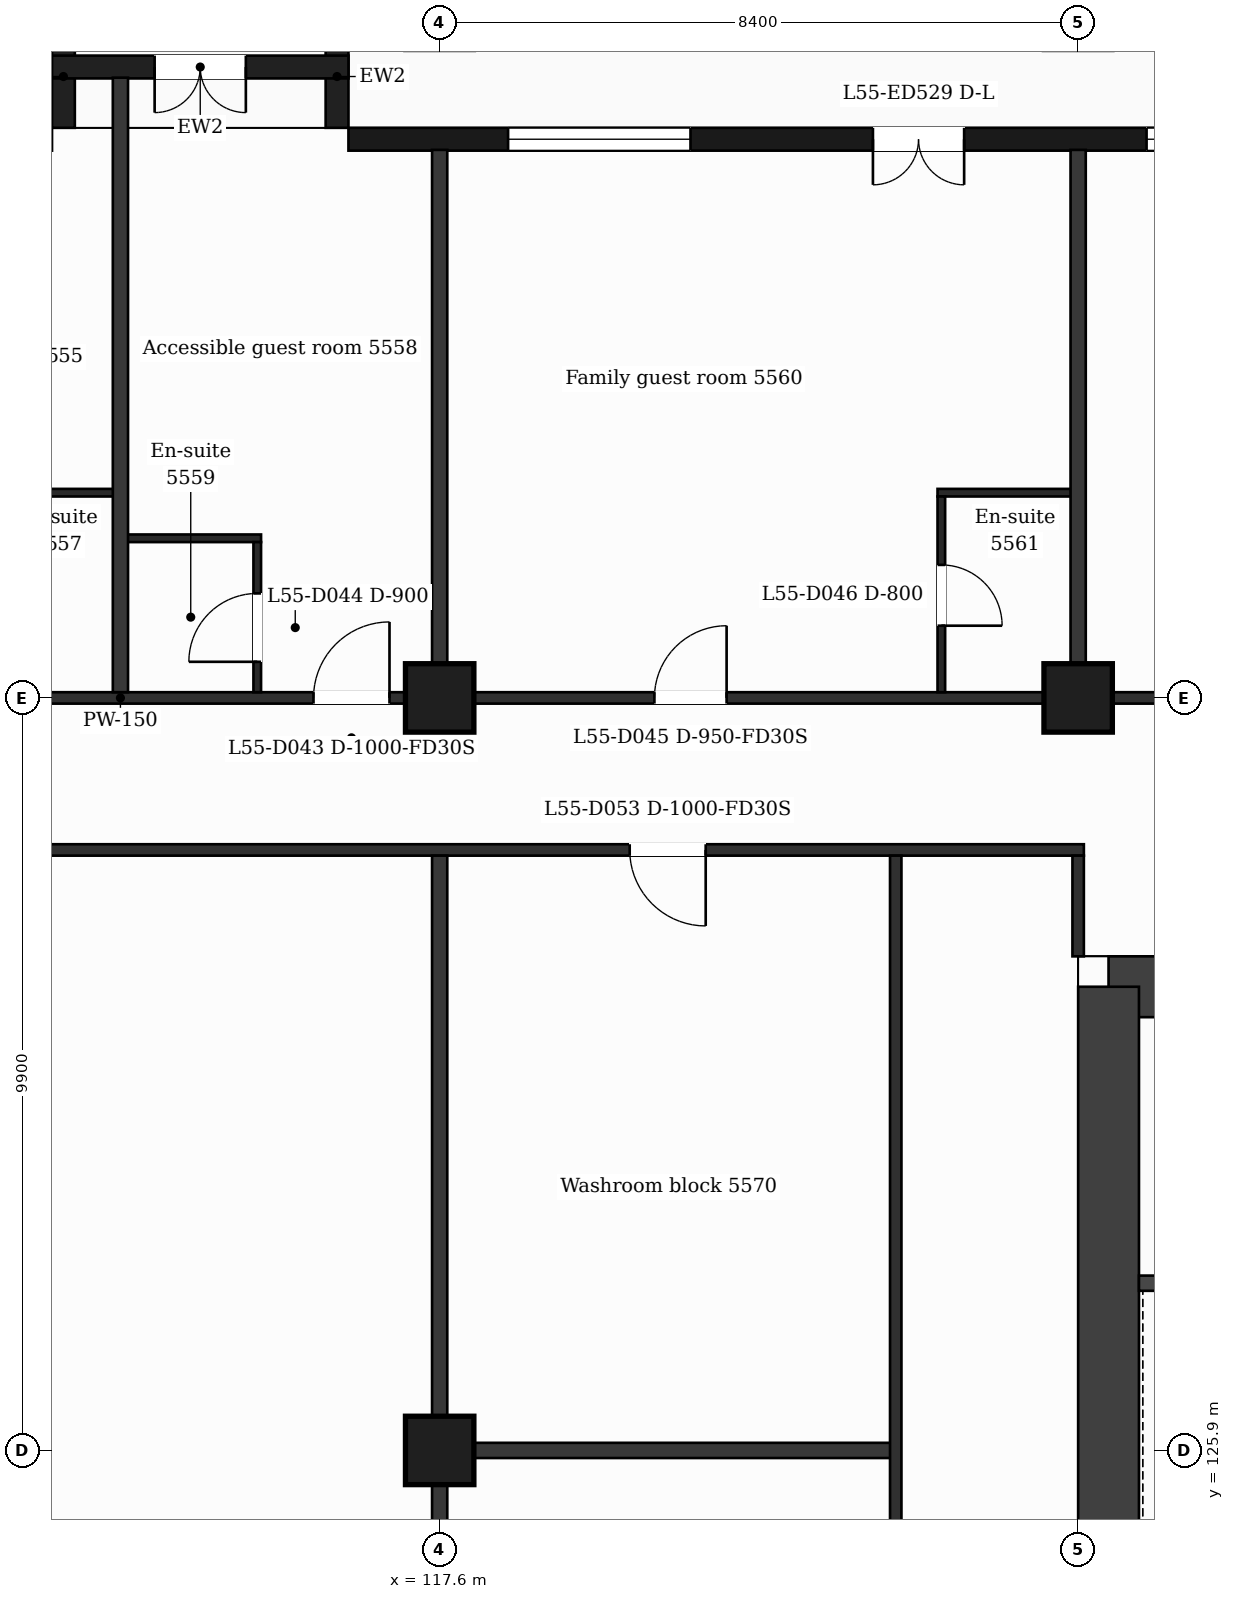
"""IFC4 building model, lengths in metres.
Left out: names, types, materials, properties, quantities, classifications, styles, units other than length and angle.
Written with IfcOpenShell. Run it as: python <this file> out.ifc"""

import sys

from ifc_helpers import new_model, si_unit, direction, frame, frame_2d, origin, origin_2d, place, context, subcontext, project, spatial, rectangle, extrude, element, fill, save


model = new_model("IFC4")
c1 = context("Model", 3, precision=1e-05, world=origin(), true_north=direction((0.0, 1.0)))
c2 = subcontext(c1, "Body", "Model", "MODEL_VIEW")
j1 = project(units=[si_unit("LENGTHUNIT", "METRE"), si_unit("PLANEANGLEUNIT", "RADIAN")], contexts=[c1])
p1 = place(None, origin())
s1 = spatial("IfcSite", under=j1, at=p1, CompositionType="ELEMENT")
p2 = place(p1, origin())
s2 = spatial("IfcBuilding", under=s1, at=p2, CompositionType="ELEMENT")
p3 = place(p2, frame((0.0, 0.0, 228.1)))
s3 = spatial("IfcBuildingStorey", under=s2, at=p3, CompositionType="ELEMENT", Elevation=228.1)
p4 = place(p3, frame((126.4, 132.0, 0.0), z_axis=(0.0, 0.0, 1.0), x_axis=(1.0, 0.0, 0.0)))
e1 = element("IfcWall", 1, at=p4, inside=s3, PredefinedType="SHEAR", context=c2, shape_type="SweptSolid", body=[
    extrude(rectangle(XDim=11.42, YDim=0.8, at=frame_2d((5.71, 0.0))), origin(), (0.0, 0.0, 1.0), 3.7),
])
p5 = place(p4, frame((3.386, 0.0, 0.0)))
e2 = element("IfcOpeningElement", 2, at=p5, cuts=e1, PredefinedType="OPENING", context=c2, shape_type="SweptSolid", body=[
    extrude(rectangle(XDim=1.2, YDim=2.1, at=frame_2d((0.6, 1.05))), frame((0.0, 0.41, 0.0), z_axis=(0.0, -1.0, 0.0), x_axis=(1.0, 0.0, 0.0)), (0.0, 0.0, 1.0), 0.82),
])
p6 = place(p3, frame((126.4, 110.8, 0.0), z_axis=(0.0, 0.0, 1.0), x_axis=(0.0, 1.0, 0.0)))
e3 = element("IfcWall", 3, at=p6, inside=s3, PredefinedType="SHEAR", context=c2, shape_type="SweptSolid", body=[
    extrude(rectangle(XDim=21.2, YDim=0.8, at=frame_2d((10.6, 0.0))), origin(), (0.0, 0.0, 1.0), 3.7),
])
p7 = place(p6, frame((11.95, 0.0, 0.0)))
e4 = element("IfcOpeningElement", 4, at=p7, cuts=e3, PredefinedType="OPENING", context=c2, shape_type="SweptSolid", body=[
    extrude(rectangle(XDim=1.4, YDim=2.1, at=frame_2d((0.7, 1.05))), frame((0.0, 0.41, 0.0), z_axis=(0.0, -1.0, 0.0), x_axis=(1.0, 0.0, 0.0)), (0.0, 0.0, 1.0), 0.82),
])
for number, where, z_axis, x_axis in (
    (5, (117.6, 125.9, 0.0), (0.0, 0.0, 1.0), (1.0, 0.0, 0.0)),
    (6, (117.6, 135.8, 0.0), (0.0, 0.0, 1.0), (1.0, 0.0, 0.0)),
    (7, (126.0, 135.8, 0.0), (0.0, 0.0, 1.0), (1.0, 0.0, 0.0)),
):
    element("IfcColumn", number, at=place(p3, frame(where, z_axis=z_axis, x_axis=x_axis)), inside=s3, PredefinedType="COLUMN", context=c2, shape_type="SweptSolid", body=[
        extrude(rectangle(XDim=0.9, YDim=0.9, at=origin_2d()), origin(), (0.0, 0.0, 1.0), 3.7),
    ])
p8 = place(p3, frame((130.65, 143.15, 0.0), z_axis=(0.0, 0.0, 1.0), x_axis=(-1.0, 0.0, 0.0)))
e8 = element("IfcWall", 8, at=p8, inside=s3, PredefinedType="SOLIDWALL", context=c2, shape_type="SweptSolid", body=[
    extrude(rectangle(XDim=14.25, YDim=0.3, at=frame_2d((7.125, 0.0))), origin(), (0.0, 0.0, 1.0), 3.38),
])
p9 = place(p8, frame((1.35, 0.0, 0.9)))
e9 = element("IfcOpeningElement", 9, at=p9, cuts=e8, PredefinedType="OPENING", context=c2, shape_type="SweptSolid", body=[
    extrude(rectangle(XDim=2.4, YDim=2.1, at=frame_2d((1.2, 1.05))), frame((0.0, 0.16, 0.0), z_axis=(0.0, -1.0, 0.0), x_axis=(1.0, 0.0, 0.0)), (0.0, 0.0, 1.0), 0.32),
])
p10 = place(p8, frame((6.15, 0.0, 0.0)))
e10 = element("IfcOpeningElement", 10, at=p10, cuts=e8, PredefinedType="OPENING", context=c2, shape_type="SweptSolid", body=[
    extrude(rectangle(XDim=1.2, YDim=2.4, at=frame_2d((0.6, 1.2))), frame((0.0, 0.16, 0.0), z_axis=(0.0, -1.0, 0.0), x_axis=(1.0, 0.0, 0.0)), (0.0, 0.0, 1.0), 0.32),
])
p11 = place(p8, frame((9.75, 0.0, 0.9)))
e11 = element("IfcOpeningElement", 11, at=p11, cuts=e8, PredefinedType="OPENING", context=c2, shape_type="SweptSolid", body=[
    extrude(rectangle(XDim=2.4, YDim=2.1, at=frame_2d((1.2, 1.05))), frame((0.0, 0.16, 0.0), z_axis=(0.0, -1.0, 0.0), x_axis=(1.0, 0.0, 0.0)), (0.0, 0.0, 1.0), 0.32),
])
for number, where, z_axis, x_axis in (
    (12, (116.25, 143.3, 0.0), (0.0, 0.0, 1.0), (0.0, 1.0, 0.0)),
    (13, (112.65, 143.3, 0.0), (0.0, 0.0, 1.0), (0.0, 1.0, 0.0)),
):
    element("IfcWall", number, at=place(p3, frame(where, z_axis=z_axis, x_axis=x_axis)), inside=s3, PredefinedType="SOLIDWALL", context=c2, shape_type="SweptSolid", body=[
        extrude(rectangle(XDim=1.35, YDim=0.3, at=frame_2d((0.675, 0.0))), origin(), (0.0, 0.0, 1.0), 3.38),
    ])
p12 = place(p3, frame((116.4, 144.1, 0.0), z_axis=(0.0, 0.0, 1.0), x_axis=(-1.0, 0.0, 0.0)))
e14 = element("IfcWall", 14, at=p12, inside=s3, PredefinedType="SOLIDWALL", context=c2, shape_type="SweptSolid", body=[
    extrude(rectangle(XDim=3.9, YDim=0.3, at=frame_2d((1.95, 0.0))), origin(), (0.0, 0.0, 1.0), 3.38),
])
p13 = place(p12, frame((1.35, 0.0, 0.0)))
e15 = element("IfcOpeningElement", 15, at=p13, cuts=e14, PredefinedType="OPENING", context=c2, shape_type="SweptSolid", body=[
    extrude(rectangle(XDim=1.2, YDim=2.4, at=frame_2d((0.6, 1.2))), frame((0.0, 0.16, 0.0), z_axis=(0.0, -1.0, 0.0), x_axis=(1.0, 0.0, 0.0)), (0.0, 0.0, 1.0), 0.32),
])
p14 = place(p3, frame((117.6, 125.9, 0.0), z_axis=(0.0, 0.0, 1.0), x_axis=(1.0, 0.0, 0.0)))
e16 = element("IfcWall", 16, at=p14, inside=s3, PredefinedType="PARTITIONING", context=c2, shape_type="SweptSolid", body=[
    extrude(rectangle(XDim=6.0, YDim=0.2, at=frame_2d((3.0, 0.0))), origin(), (0.0, 0.0, 1.0), 3.38),
])
p15 = place(p3, frame((126.8, 128.1, 0.0), z_axis=(0.0, 0.0, 1.0), x_axis=(1.0, 0.0, 0.0)))
e17 = element("IfcWall", 17, at=p15, inside=s3, PredefinedType="PARTITIONING", context=c2, shape_type="SweptSolid", body=[
    extrude(rectangle(XDim=4.782, YDim=0.2, at=frame_2d((2.391, 0.0))), origin(), (0.0, 0.0, 1.0), 3.38),
])
p16 = place(p15, frame((2.977, 0.0, 0.0)))
e18 = element("IfcOpeningElement", 18, at=p16, cuts=e17, PredefinedType="OPENING", context=c2, shape_type="SweptSolid", body=[
    extrude(rectangle(XDim=1.1, YDim=2.1, at=frame_2d((0.55, 1.05))), frame((0.0, 0.11, 0.0), z_axis=(0.0, -1.0, 0.0), x_axis=(1.0, 0.0, 0.0)), (0.0, 0.0, 1.0), 0.22),
])
p17 = place(p3, frame((100.725, 133.8, 0.0), z_axis=(0.0, 0.0, 1.0), x_axis=(1.0, 0.0, 0.0)))
e19 = element("IfcWall", 19, at=p17, inside=s3, PredefinedType="PARTITIONING", context=c2, shape_type="SweptSolid", body=[
    extrude(rectangle(XDim=25.35, YDim=0.15, at=frame_2d((12.675, 0.0))), origin(), (0.0, 0.0, 1.0), 3.38),
])
p18 = place(p17, frame((6.05, 0.0, 0.0)))
e20 = element("IfcOpeningElement", 20, at=p18, cuts=e19, PredefinedType="OPENING", context=c2, shape_type="SweptSolid", body=[
    extrude(rectangle(XDim=1.0, YDim=2.1, at=frame_2d((0.5, 1.05))), frame((0.0, 0.085, 0.0), z_axis=(0.0, -1.0, 0.0), x_axis=(1.0, 0.0, 0.0)), (0.0, 0.0, 1.0), 0.17),
])
p19 = place(p17, frame((19.375, 0.0, 0.0)))
e21 = element("IfcOpeningElement", 21, at=p19, cuts=e19, PredefinedType="OPENING", context=c2, shape_type="SweptSolid", body=[
    extrude(rectangle(XDim=1.0, YDim=2.1, at=frame_2d((0.5, 1.05))), frame((0.0, 0.085, 0.0), z_axis=(0.0, -1.0, 0.0), x_axis=(1.0, 0.0, 0.0)), (0.0, 0.0, 1.0), 0.17),
])
p20 = place(p3, frame((90.895, 135.8, 0.0), z_axis=(0.0, 0.0, 1.0), x_axis=(1.0, 0.0, 0.0)))
e22 = element("IfcWall", 22, at=p20, inside=s3, PredefinedType="PARTITIONING", context=c2, shape_type="SweptSolid", body=[
    extrude(rectangle(XDim=45.011, YDim=0.15, at=frame_2d((22.505, 0.0))), origin(), (0.0, 0.0, 1.0), 3.38),
])
p21 = place(p20, frame((6.906, 0.0, 0.0)))
e23 = element("IfcOpeningElement", 23, at=p21, cuts=e22, PredefinedType="OPENING", context=c2, shape_type="SweptSolid", body=[
    extrude(rectangle(XDim=1.0, YDim=2.1, at=frame_2d((0.5, 1.05))), frame((0.0, 0.085, 0.0), z_axis=(0.0, -1.0, 0.0), x_axis=(1.0, 0.0, 0.0)), (0.0, 0.0, 1.0), 0.17),
])
p22 = place(p20, frame((15.281, 0.0, 0.0)))
e24 = element("IfcOpeningElement", 24, at=p22, cuts=e22, PredefinedType="OPENING", context=c2, shape_type="SweptSolid", body=[
    extrude(rectangle(XDim=1.0, YDim=2.1, at=frame_2d((0.5, 1.05))), frame((0.0, 0.085, 0.0), z_axis=(0.0, -1.0, 0.0), x_axis=(1.0, 0.0, 0.0)), (0.0, 0.0, 1.0), 0.17),
])
p23 = place(p20, frame((25.045, 0.0, 0.0)))
e25 = element("IfcOpeningElement", 25, at=p23, cuts=e22, PredefinedType="OPENING", context=c2, shape_type="SweptSolid", body=[
    extrude(rectangle(XDim=1.0, YDim=2.1, at=frame_2d((0.5, 1.05))), frame((0.0, 0.085, 0.0), z_axis=(0.0, -1.0, 0.0), x_axis=(1.0, 0.0, 0.0)), (0.0, 0.0, 1.0), 0.17),
])
p24 = place(p20, frame((29.531, 0.0, 0.0)))
e26 = element("IfcOpeningElement", 26, at=p24, cuts=e22, PredefinedType="OPENING", context=c2, shape_type="SweptSolid", body=[
    extrude(rectangle(XDim=0.95, YDim=2.1, at=frame_2d((0.475, 1.05))), frame((0.0, 0.085, 0.0), z_axis=(0.0, -1.0, 0.0), x_axis=(1.0, 0.0, 0.0)), (0.0, 0.0, 1.0), 0.17),
])
p25 = place(p20, frame((39.814, 0.0, 0.0)))
e27 = element("IfcOpeningElement", 27, at=p25, cuts=e22, PredefinedType="OPENING", context=c2, shape_type="SweptSolid", body=[
    extrude(rectangle(XDim=0.95, YDim=2.1, at=frame_2d((0.475, 1.05))), frame((0.0, 0.085, 0.0), z_axis=(0.0, -1.0, 0.0), x_axis=(1.0, 0.0, 0.0)), (0.0, 0.0, 1.0), 0.17),
])
p26 = place(p3, frame((113.4, 137.9, 0.0), z_axis=(0.0, 0.0, 1.0), x_axis=(1.0, 0.0, 0.0)))
e28 = element("IfcWall", 28, at=p26, inside=s3, PredefinedType="PARTITIONING", context=c2, shape_type="SweptSolid", body=[
    extrude(rectangle(XDim=1.85, YDim=0.1, at=frame_2d((0.925, 0.0))), origin(), (0.0, 0.0, 1.0), 3.38),
])
p27 = place(p3, frame((111.55, 138.5, 0.0), z_axis=(0.0, 0.0, 1.0), x_axis=(1.0, 0.0, 0.0)))
e29 = element("IfcWall", 29, at=p27, inside=s3, PredefinedType="PARTITIONING", context=c2, shape_type="SweptSolid", body=[
    extrude(rectangle(XDim=1.85, YDim=0.1, at=frame_2d((0.925, 0.0))), origin(), (0.0, 0.0, 1.0), 3.38),
])
p28 = place(p3, frame((124.15, 138.5, 0.0), z_axis=(0.0, 0.0, 1.0), x_axis=(1.0, 0.0, 0.0)))
e30 = element("IfcWall", 30, at=p28, inside=s3, PredefinedType="PARTITIONING", context=c2, shape_type="SweptSolid", body=[
    extrude(rectangle(XDim=1.85, YDim=0.1, at=frame_2d((0.925, 0.0))), origin(), (0.0, 0.0, 1.0), 3.38),
])
p29 = place(p3, frame((113.4, 135.875, 0.0), z_axis=(0.0, 0.0, 1.0), x_axis=(0.0, 1.0, 0.0)))
e31 = element("IfcWall", 31, at=p29, inside=s3, PredefinedType="PARTITIONING", context=c2, shape_type="SweptSolid", body=[
    extrude(rectangle(XDim=8.085, YDim=0.2, at=frame_2d((4.042, 0.0))), origin(), (0.0, 0.0, 1.0), 3.38),
])
p30 = place(p3, frame((115.2, 135.875, 0.0), z_axis=(0.0, 0.0, 1.0), x_axis=(0.0, 1.0, 0.0)))
e32 = element("IfcWall", 32, at=p30, inside=s3, PredefinedType="PARTITIONING", context=c2, shape_type="SweptSolid", body=[
    extrude(rectangle(XDim=1.975, YDim=0.1, at=frame_2d((0.988, 0.0))), origin(), (0.0, 0.0, 1.0), 3.38),
])
p31 = place(p30, frame((0.4, 0.0, 0.0)))
e33 = element("IfcOpeningElement", 33, at=p31, cuts=e32, PredefinedType="OPENING", context=c2, shape_type="SweptSolid", body=[
    extrude(rectangle(XDim=0.9, YDim=2.1, at=frame_2d((0.45, 1.05))), frame((0.0, 0.06, 0.0), z_axis=(0.0, -1.0, 0.0), x_axis=(1.0, 0.0, 0.0)), (0.0, 0.0, 1.0), 0.12),
])
p32 = place(p3, frame((117.6, 109.075, 0.0), z_axis=(0.0, 0.0, 1.0), x_axis=(0.0, 1.0, 0.0)))
e34 = element("IfcWall", 34, at=p32, inside=s3, PredefinedType="PARTITIONING", context=c2, shape_type="SweptSolid", body=[
    extrude(rectangle(XDim=24.65, YDim=0.2, at=frame_2d((12.325, 0.0))), origin(), (0.0, 0.0, 1.0), 3.38),
])
p33 = place(p3, frame((117.6, 135.875, 0.0), z_axis=(0.0, 0.0, 1.0), x_axis=(0.0, 1.0, 0.0)))
e35 = element("IfcWall", 35, at=p33, inside=s3, PredefinedType="PARTITIONING", context=c2, shape_type="SweptSolid", body=[
    extrude(rectangle(XDim=7.135, YDim=0.2, at=frame_2d((3.567, 0.0))), origin(), (0.0, 0.0, 1.0), 3.38),
])
p34 = place(p3, frame((123.6, 109.075, 0.0), z_axis=(0.0, 0.0, 1.0), x_axis=(0.0, 1.0, 0.0)))
e36 = element("IfcWall", 36, at=p34, inside=s3, PredefinedType="PARTITIONING", context=c2, shape_type="SweptSolid", body=[
    extrude(rectangle(XDim=24.65, YDim=0.15, at=frame_2d((12.325, 0.0))), origin(), (0.0, 0.0, 1.0), 3.38),
])
p35 = place(p3, frame((124.2, 135.875, 0.0), z_axis=(0.0, 0.0, 1.0), x_axis=(0.0, 1.0, 0.0)))
e37 = element("IfcWall", 37, at=p35, inside=s3, PredefinedType="PARTITIONING", context=c2, shape_type="SweptSolid", body=[
    extrude(rectangle(XDim=2.575, YDim=0.1, at=frame_2d((1.288, 0.0))), origin(), (0.0, 0.0, 1.0), 3.38),
])
p36 = place(p35, frame((0.875, 0.0, 0.0)))
e38 = element("IfcOpeningElement", 38, at=p36, cuts=e37, PredefinedType="OPENING", context=c2, shape_type="SweptSolid", body=[
    extrude(rectangle(XDim=0.8, YDim=2.1, at=frame_2d((0.4, 1.05))), frame((0.0, 0.06, 0.0), z_axis=(0.0, -1.0, 0.0), x_axis=(1.0, 0.0, 0.0)), (0.0, 0.0, 1.0), 0.12),
])
p37 = place(p3, frame((126.0, 135.875, 0.0), z_axis=(0.0, 0.0, 1.0), x_axis=(0.0, 1.0, 0.0)))
e39 = element("IfcWall", 39, at=p37, inside=s3, PredefinedType="PARTITIONING", context=c2, shape_type="SweptSolid", body=[
    extrude(rectangle(XDim=7.135, YDim=0.2, at=frame_2d((3.567, 0.0))), origin(), (0.0, 0.0, 1.0), 3.38),
])
p38 = place(p3, frame((126.0, 132.4, 0.0), z_axis=(0.0, 0.0, 1.0), x_axis=(0.0, 1.0, 0.0)))
e40 = element("IfcWall", 40, at=p38, inside=s3, PredefinedType="PARTITIONING", context=c2, shape_type="SweptSolid", body=[
    extrude(rectangle(XDim=1.325, YDim=0.15, at=frame_2d((0.663, 0.0))), origin(), (0.0, 0.0, 1.0), 3.38),
])
p39 = place(p9, origin())
e41 = element("IfcWindow", 41, at=p39, inside=s3, PartitioningType="SINGLE_PANEL", PredefinedType="WINDOW", context=c2, shape_type="SweptSolid", body=[
    extrude(rectangle(XDim=2.4, YDim=2.1, at=frame_2d((1.2, 1.05))), frame((0.0, 0.03, 0.0), z_axis=(0.0, -1.0, 0.0), x_axis=(1.0, 0.0, 0.0)), (0.0, 0.0, 1.0), 0.06),
])
fill(e9, e41)
p40 = place(p10, origin())
e42 = element("IfcDoor", 42, at=p40, inside=s3, OperationType="DOUBLE_DOOR_SINGLE_SWING", PredefinedType="DOOR", context=c2, shape_type="SweptSolid", body=[
    extrude(rectangle(XDim=1.2, YDim=2.4, at=frame_2d((0.6, 1.2))), frame((0.0, 0.025, 0.0), z_axis=(0.0, -1.0, 0.0), x_axis=(1.0, 0.0, 0.0)), (0.0, 0.0, 1.0), 0.05),
])
fill(e10, e42)
p41 = place(p11, origin())
e43 = element("IfcWindow", 43, at=p41, inside=s3, PartitioningType="SINGLE_PANEL", PredefinedType="WINDOW", context=c2, shape_type="SweptSolid", body=[
    extrude(rectangle(XDim=2.4, YDim=2.1, at=frame_2d((1.2, 1.05))), frame((0.0, 0.03, 0.0), z_axis=(0.0, -1.0, 0.0), x_axis=(1.0, 0.0, 0.0)), (0.0, 0.0, 1.0), 0.06),
])
fill(e11, e43)
p42 = place(p13, origin())
e44 = element("IfcDoor", 44, at=p42, inside=s3, OperationType="DOUBLE_DOOR_SINGLE_SWING", PredefinedType="DOOR", context=c2, shape_type="SweptSolid", body=[
    extrude(rectangle(XDim=1.2, YDim=2.4, at=frame_2d((0.6, 1.2))), frame((0.0, 0.025, 0.0), z_axis=(0.0, -1.0, 0.0), x_axis=(1.0, 0.0, 0.0)), (0.0, 0.0, 1.0), 0.05),
])
fill(e15, e44)
p43 = place(p23, origin())
e45 = element("IfcDoor", 45, at=p43, inside=s3, OperationType="SINGLE_SWING_RIGHT", PredefinedType="DOOR", context=c2, shape_type="SweptSolid", body=[
    extrude(rectangle(XDim=1.0, YDim=2.1, at=frame_2d((0.5, 1.05))), frame((0.0, 0.025, 0.0), z_axis=(0.0, -1.0, 0.0), x_axis=(1.0, 0.0, 0.0)), (0.0, 0.0, 1.0), 0.05),
])
fill(e25, e45)
p44 = place(p31, origin())
e46 = element("IfcDoor", 46, at=p44, inside=s3, OperationType="SINGLE_SWING_LEFT", PredefinedType="DOOR", context=c2, shape_type="SweptSolid", body=[
    extrude(rectangle(XDim=0.9, YDim=2.1, at=frame_2d((0.45, 1.05))), frame((0.0, 0.025, 0.0), z_axis=(0.0, -1.0, 0.0), x_axis=(1.0, 0.0, 0.0)), (0.0, 0.0, 1.0), 0.05),
])
fill(e33, e46)
p45 = place(p24, origin())
e47 = element("IfcDoor", 47, at=p45, inside=s3, OperationType="SINGLE_SWING_RIGHT", PredefinedType="DOOR", context=c2, shape_type="SweptSolid", body=[
    extrude(rectangle(XDim=0.95, YDim=2.1, at=frame_2d((0.475, 1.05))), frame((0.0, 0.025, 0.0), z_axis=(0.0, -1.0, 0.0), x_axis=(1.0, 0.0, 0.0)), (0.0, 0.0, 1.0), 0.05),
])
fill(e26, e47)
p46 = place(p36, origin())
e48 = element("IfcDoor", 48, at=p46, inside=s3, OperationType="SINGLE_SWING_LEFT", PredefinedType="DOOR", context=c2, shape_type="SweptSolid", body=[
    extrude(rectangle(XDim=0.8, YDim=2.1, at=frame_2d((0.4, 1.05))), frame((0.0, 0.025, 0.0), z_axis=(0.0, -1.0, 0.0), x_axis=(1.0, 0.0, 0.0)), (0.0, 0.0, 1.0), 0.05),
])
fill(e38, e48)
p47 = place(p19, origin())
e49 = element("IfcDoor", 49, at=p47, inside=s3, OperationType="SINGLE_SWING_RIGHT", PredefinedType="DOOR", context=c2, shape_type="SweptSolid", body=[
    extrude(rectangle(XDim=1.0, YDim=2.1, at=frame_2d((0.5, 1.05))), frame((0.0, 0.025, 0.0), z_axis=(0.0, -1.0, 0.0), x_axis=(1.0, 0.0, 0.0)), (0.0, 0.0, 1.0), 0.05),
])
fill(e21, e49)
save(model, sys.argv[1])
